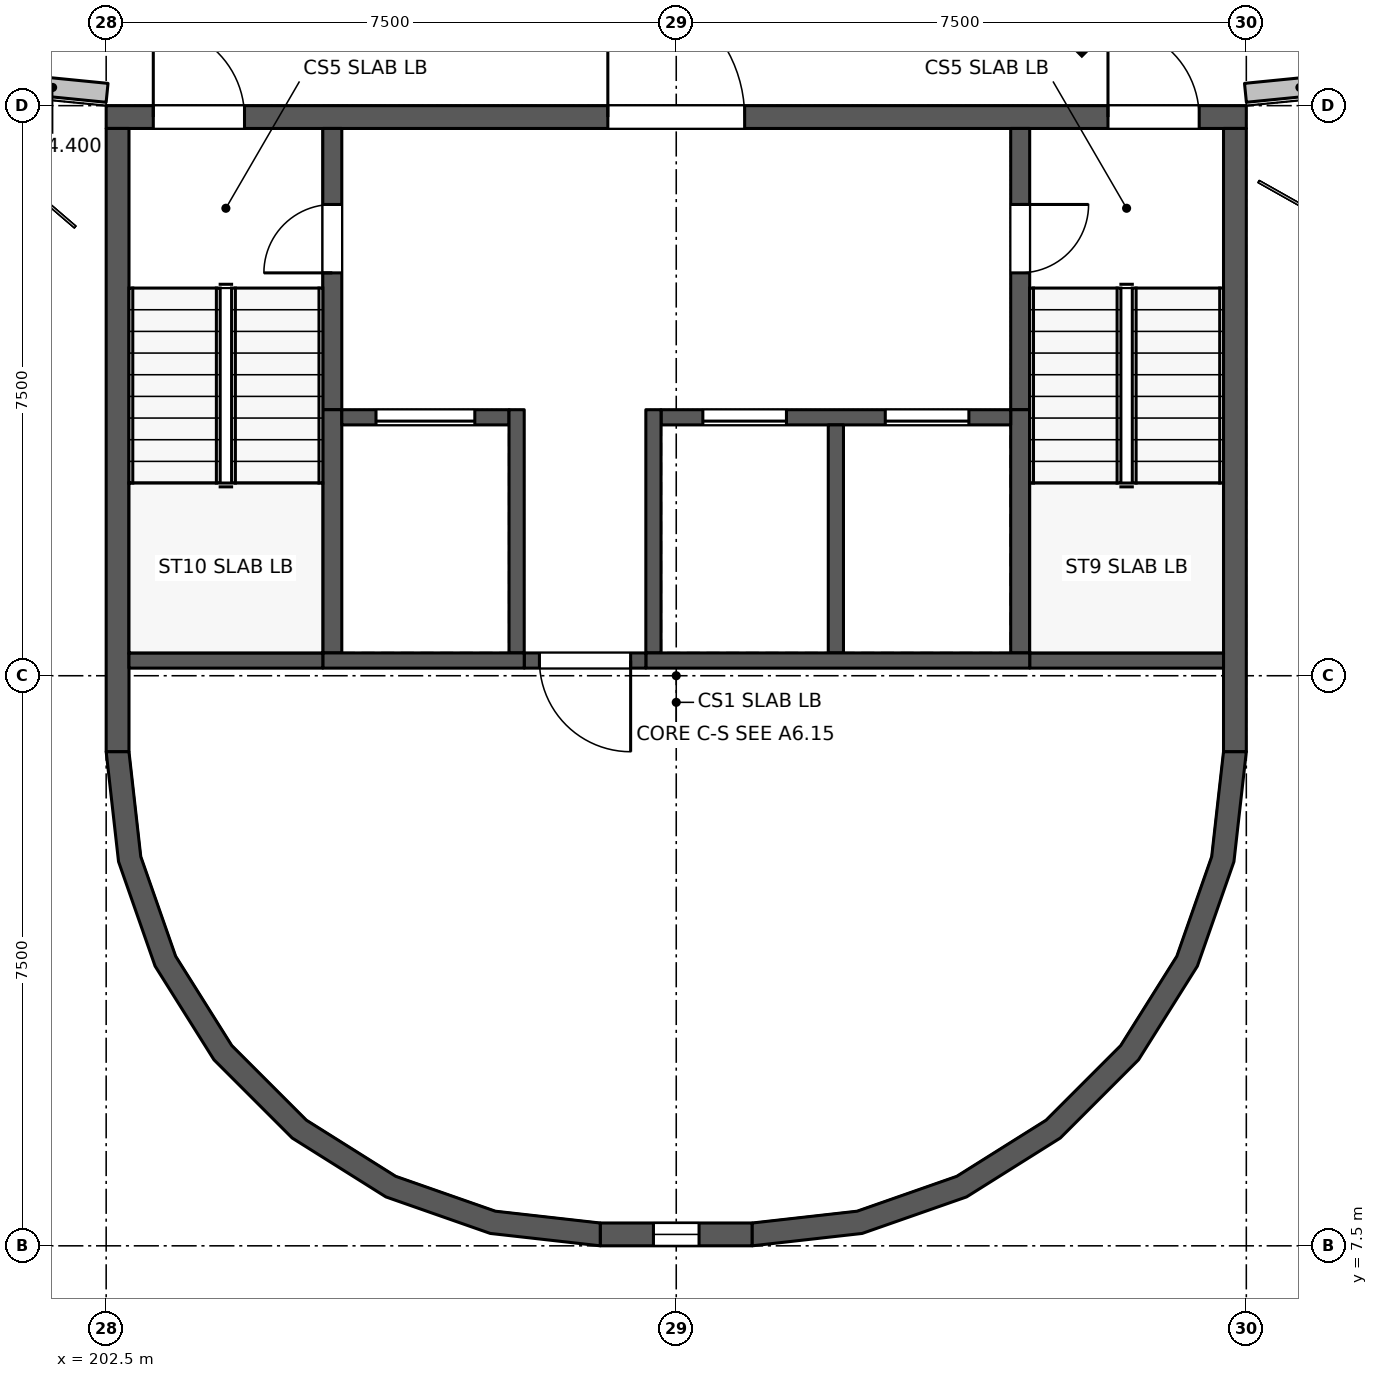
"""IFC4 building model, lengths in metres.
Left out: names, types, materials, properties, quantities, classifications, styles, units other than length and angle.
Written with IfcOpenShell. Run it as: python <this file> out.ifc"""

import sys

from ifc_helpers import new_model, si_unit, direction, frame, frame_2d, origin, place, context, subcontext, project, spatial, polyline, rectangle, outline, extrude, element, fill, save


model = new_model("IFC4")
c1 = context("Model", 3, precision=1e-05, world=origin(), true_north=direction((0.0, 1.0)))
c2 = subcontext(c1, "Body", "Model", "MODEL_VIEW")
j1 = project(units=[si_unit("LENGTHUNIT", "METRE"), si_unit("PLANEANGLEUNIT", "RADIAN")], contexts=[c1])
p1 = place(None, origin())
s1 = spatial("IfcSite", under=j1, at=p1, CompositionType="ELEMENT")
p2 = place(p1, origin())
s2 = spatial("IfcBuilding", under=s1, at=p2, CompositionType="ELEMENT")
p3 = place(p2, frame((0.0, 0.0, 3.3)))
s3 = spatial("IfcBuildingStorey", under=s2, at=p3, CompositionType="ELEMENT", Elevation=3.3)
p4 = place(p3, frame((201.079, 22.811, 0.0), z_axis=(0.0, 0.0, 1.0), x_axis=(0.995137391066, -0.098496562898, 0.0)))
e1 = element("IfcWall", 1, at=p4, inside=s3, PredefinedType="SOLIDWALL", context=c2, shape_type="SweptSolid", body=[
    extrude(rectangle(XDim=1.44, YDim=0.25, at=frame_2d((0.72, 0.0))), origin(), (0.0, 0.0, 1.0), 1.1),
])
p5 = place(p3, frame((217.489, 22.669, 0.0), z_axis=(0.0, 0.0, 1.0), x_axis=(0.995122410186, 0.098647801521, 0.0)))
e2 = element("IfcWall", 2, at=p5, inside=s3, PredefinedType="SOLIDWALL", context=c2, shape_type="SweptSolid", body=[
    extrude(rectangle(XDim=1.44, YDim=0.25, at=frame_2d((0.72, 0.0))), origin(), (0.0, 0.0, 1.0), 1.1),
])
p6 = place(p3, frame((202.5, 22.35, 0.0), z_axis=(0.0, 0.0, 1.0), x_axis=(1.0, 0.0, 0.0)))
e3 = element("IfcWall", 3, at=p6, inside=s3, PredefinedType="SHEAR", context=c2, shape_type="SweptSolid", body=[
    extrude(rectangle(XDim=15.0, YDim=0.3, at=frame_2d((7.5, 0.0))), origin(), (0.0, 0.0, 1.0), 3.3),
])
p7 = place(p6, frame((13.18, 0.0, 0.0)))
e4 = element("IfcOpeningElement", 4, at=p7, cuts=e3, PredefinedType="OPENING", context=c2, shape_type="SweptSolid", body=[
    extrude(rectangle(XDim=1.2, YDim=2.1, at=frame_2d((0.6, 1.05))), frame((0.0, 0.16, 0.0), z_axis=(0.0, -1.0, 0.0), x_axis=(1.0, 0.0, 0.0)), (0.0, 0.0, 1.0), 0.32),
])
p8 = place(p6, frame((0.62, 0.0, 0.0)))
e5 = element("IfcOpeningElement", 5, at=p8, cuts=e3, PredefinedType="OPENING", context=c2, shape_type="SweptSolid", body=[
    extrude(rectangle(XDim=1.2, YDim=2.1, at=frame_2d((0.6, 1.05))), frame((0.0, 0.16, 0.0), z_axis=(0.0, -1.0, 0.0), x_axis=(1.0, 0.0, 0.0)), (0.0, 0.0, 1.0), 0.32),
])
p9 = place(p6, frame((6.6, 0.0, 0.0)))
e6 = element("IfcOpeningElement", 6, at=p9, cuts=e3, PredefinedType="OPENING", context=c2, shape_type="SweptSolid", body=[
    extrude(rectangle(XDim=1.8, YDim=2.1, at=frame_2d((0.9, 1.05))), frame((0.0, 0.16, 0.0), z_axis=(0.0, -1.0, 0.0), x_axis=(1.0, 0.0, 0.0)), (0.0, 0.0, 1.0), 0.32),
])
p10 = place(p3, frame((211.0, 7.65, 0.0), z_axis=(0.0, 0.0, 1.0), x_axis=(-1.0, 0.0, 0.0)))
e7 = element("IfcWall", 7, at=p10, inside=s3, PredefinedType="SHEAR", context=c2, shape_type="SweptSolid", body=[
    extrude(rectangle(XDim=2.0, YDim=0.3, at=frame_2d((1.0, 0.0))), origin(), (0.0, 0.0, 1.0), 3.3),
])
p11 = place(p10, frame((0.7, 0.0, 0.3)))
e8 = element("IfcOpeningElement", 8, at=p11, cuts=e7, PredefinedType="OPENING", context=c2, shape_type="SweptSolid", body=[
    extrude(rectangle(XDim=0.6, YDim=2.7, at=frame_2d((0.3, 1.35))), frame((0.0, 0.16, 0.0), z_axis=(0.0, -1.0, 0.0), x_axis=(1.0, 0.0, 0.0)), (0.0, 0.0, 1.0), 0.32),
])
for number, where, z_axis, x_axis in (
    (9, (217.35, 22.2, 0.0), (0.0, 0.0, 1.0), (0.0, -1.0, 0.0)),
    (10, (202.65, 14.0, 0.0), (0.0, 0.0, 1.0), (0.0, 1.0, 0.0)),
):
    element("IfcWall", number, at=place(p3, frame(where, z_axis=z_axis, x_axis=x_axis)), inside=s3, PredefinedType="SHEAR", context=c2, shape_type="SweptSolid", body=[
        extrude(rectangle(XDim=8.2, YDim=0.3, at=frame_2d((4.1, 0.0))), origin(), (0.0, 0.0, 1.0), 3.3),
    ])
p12 = place(p3, frame((214.525, 22.2, 0.0), z_axis=(0.0, 0.0, 1.0), x_axis=(0.0, -1.0, 0.0)))
e11 = element("IfcWall", 11, at=p12, inside=s3, PredefinedType="STANDARD", context=c2, shape_type="SweptSolid", body=[
    extrude(rectangle(XDim=3.7, YDim=0.25, at=frame_2d((1.85, 0.0))), origin(), (0.0, 0.0, 1.0), 3.1),
])
p13 = place(p12, frame((1.0, 0.0, 0.0)))
e12 = element("IfcOpeningElement", 12, at=p13, cuts=e11, PredefinedType="OPENING", context=c2, shape_type="SweptSolid", body=[
    extrude(rectangle(XDim=0.9, YDim=2.1, at=frame_2d((0.45, 1.05))), frame((0.0, 0.135, 0.0), z_axis=(0.0, -1.0, 0.0), x_axis=(1.0, 0.0, 0.0)), (0.0, 0.0, 1.0), 0.27),
])
p14 = place(p3, frame((214.525, 18.5, 0.0), z_axis=(0.0, 0.0, 1.0), x_axis=(0.0, -1.0, 0.0)))
e13 = element("IfcWall", 13, at=p14, inside=s3, PredefinedType="STANDARD", context=c2, shape_type="SweptSolid", body=[
    extrude(rectangle(XDim=3.2, YDim=0.25, at=frame_2d((1.6, 0.0))), origin(), (0.0, 0.0, 1.0), 3.1),
])
p15 = place(p3, frame((205.475, 18.5, 0.0), z_axis=(0.0, 0.0, 1.0), x_axis=(0.0, 1.0, 0.0)))
e14 = element("IfcWall", 14, at=p15, inside=s3, PredefinedType="STANDARD", context=c2, shape_type="SweptSolid", body=[
    extrude(rectangle(XDim=3.7, YDim=0.25, at=frame_2d((1.85, 0.0))), origin(), (0.0, 0.0, 1.0), 3.1),
])
p16 = place(p15, frame((1.8, 0.0, 0.0)))
e15 = element("IfcOpeningElement", 15, at=p16, cuts=e14, PredefinedType="OPENING", context=c2, shape_type="SweptSolid", body=[
    extrude(rectangle(XDim=0.9, YDim=2.1, at=frame_2d((0.45, 1.05))), frame((0.0, 0.135, 0.0), z_axis=(0.0, -1.0, 0.0), x_axis=(1.0, 0.0, 0.0)), (0.0, 0.0, 1.0), 0.27),
])
p17 = place(p3, frame((205.475, 18.5, 0.0), z_axis=(0.0, 0.0, 1.0), x_axis=(0.0, -1.0, 0.0)))
e16 = element("IfcWall", 16, at=p17, inside=s3, PredefinedType="STANDARD", context=c2, shape_type="SweptSolid", body=[
    extrude(rectangle(XDim=3.2, YDim=0.25, at=frame_2d((1.6, 0.0))), origin(), (0.0, 0.0, 1.0), 3.1),
])
p18 = place(p3, frame((214.4, 18.4, 0.0), z_axis=(0.0, 0.0, 1.0), x_axis=(-1.0, 0.0, 0.0)))
e17 = element("IfcWall", 17, at=p18, inside=s3, PredefinedType="STANDARD", context=c2, shape_type="SweptSolid", body=[
    extrude(rectangle(XDim=4.6, YDim=0.2, at=frame_2d((2.3, 0.0))), origin(), (0.0, 0.0, 1.0), 3.1),
])
p19 = place(p18, frame((0.55, 0.0, 0.0)))
e18 = element("IfcOpeningElement", 18, at=p19, cuts=e17, PredefinedType="OPENING", context=c2, shape_type="SweptSolid", body=[
    extrude(rectangle(XDim=1.1, YDim=2.1, at=frame_2d((0.55, 1.05))), frame((0.0, 0.11, 0.0), z_axis=(0.0, -1.0, 0.0), x_axis=(1.0, 0.0, 0.0)), (0.0, 0.0, 1.0), 0.22),
])
p20 = place(p18, frame((2.95, 0.0, 0.0)))
e19 = element("IfcOpeningElement", 19, at=p20, cuts=e17, PredefinedType="OPENING", context=c2, shape_type="SweptSolid", body=[
    extrude(rectangle(XDim=1.1, YDim=2.1, at=frame_2d((0.55, 1.05))), frame((0.0, 0.11, 0.0), z_axis=(0.0, -1.0, 0.0), x_axis=(1.0, 0.0, 0.0)), (0.0, 0.0, 1.0), 0.22),
])
p21 = place(p3, frame((207.8, 18.4, 0.0), z_axis=(0.0, 0.0, 1.0), x_axis=(-1.0, 0.0, 0.0)))
e20 = element("IfcWall", 20, at=p21, inside=s3, PredefinedType="STANDARD", context=c2, shape_type="SweptSolid", body=[
    extrude(rectangle(XDim=2.2, YDim=0.2, at=frame_2d((1.1, 0.0))), origin(), (0.0, 0.0, 1.0), 3.1),
])
p22 = place(p21, frame((0.45, 0.0, 0.0)))
e21 = element("IfcOpeningElement", 21, at=p22, cuts=e20, PredefinedType="OPENING", context=c2, shape_type="SweptSolid", body=[
    extrude(rectangle(XDim=1.3, YDim=2.1, at=frame_2d((0.65, 1.05))), frame((0.0, 0.11, 0.0), z_axis=(0.0, -1.0, 0.0), x_axis=(1.0, 0.0, 0.0)), (0.0, 0.0, 1.0), 0.22),
])
p23 = place(p3, frame((212.1, 18.3, 0.0), z_axis=(0.0, 0.0, 1.0), x_axis=(0.0, -1.0, 0.0)))
e22 = element("IfcWall", 22, at=p23, inside=s3, PredefinedType="STANDARD", context=c2, shape_type="SweptSolid", body=[
    extrude(rectangle(XDim=3.0, YDim=0.2, at=frame_2d((1.5, 0.0))), origin(), (0.0, 0.0, 1.0), 3.1),
])
for number, where, z_axis, x_axis in (
    (23, (209.7, 18.5, 0.0), (0.0, 0.0, 1.0), (0.0, -1.0, 0.0)),
    (24, (207.9, 18.5, 0.0), (0.0, 0.0, 1.0), (0.0, -1.0, 0.0)),
):
    element("IfcWall", number, at=place(p3, frame(where, z_axis=z_axis, x_axis=x_axis)), inside=s3, PredefinedType="STANDARD", context=c2, shape_type="SweptSolid", body=[
        extrude(rectangle(XDim=3.2, YDim=0.2, at=frame_2d((1.6, 0.0))), origin(), (0.0, 0.0, 1.0), 3.1),
    ])
p24 = place(p3, frame((217.2, 15.2, 0.0), z_axis=(0.0, 0.0, 1.0), x_axis=(-1.0, 0.0, 0.0)))
e25 = element("IfcWall", 25, at=p24, inside=s3, PredefinedType="STANDARD", context=c2, shape_type="SweptSolid", body=[
    extrude(rectangle(XDim=2.55, YDim=0.2, at=frame_2d((1.275, 0.0))), origin(), (0.0, 0.0, 1.0), 3.1),
])
p25 = place(p3, frame((214.65, 15.2, 0.0), z_axis=(0.0, 0.0, 1.0), x_axis=(-1.0, 0.0, 0.0)))
e26 = element("IfcWall", 26, at=p25, inside=s3, PredefinedType="STANDARD", context=c2, shape_type="SweptSolid", body=[
    extrude(rectangle(XDim=5.05, YDim=0.2, at=frame_2d((2.525, 0.0))), origin(), (0.0, 0.0, 1.0), 3.1),
])
p26 = place(p3, frame((209.6, 15.2, 0.0), z_axis=(0.0, 0.0, 1.0), x_axis=(-1.0, 0.0, 0.0)))
e27 = element("IfcWall", 27, at=p26, inside=s3, PredefinedType="STANDARD", context=c2, shape_type="SweptSolid", body=[
    extrude(rectangle(XDim=1.6, YDim=0.2, at=frame_2d((0.8, 0.0))), origin(), (0.0, 0.0, 1.0), 3.1),
])
p27 = place(p26, frame((0.2, 0.0, 0.0)))
e28 = element("IfcOpeningElement", 28, at=p27, cuts=e27, PredefinedType="OPENING", context=c2, shape_type="SweptSolid", body=[
    extrude(rectangle(XDim=1.2, YDim=2.1, at=frame_2d((0.6, 1.05))), frame((0.0, 0.11, 0.0), z_axis=(0.0, -1.0, 0.0), x_axis=(1.0, 0.0, 0.0)), (0.0, 0.0, 1.0), 0.22),
])
p28 = place(p3, frame((208.0, 15.2, 0.0), z_axis=(0.0, 0.0, 1.0), x_axis=(-1.0, 0.0, 0.0)))
e29 = element("IfcWall", 29, at=p28, inside=s3, PredefinedType="STANDARD", context=c2, shape_type="SweptSolid", body=[
    extrude(rectangle(XDim=2.65, YDim=0.2, at=frame_2d((1.325, 0.0))), origin(), (0.0, 0.0, 1.0), 3.1),
])
p29 = place(p3, frame((205.35, 15.2, 0.0), z_axis=(0.0, 0.0, 1.0), x_axis=(-1.0, 0.0, 0.0)))
e30 = element("IfcWall", 30, at=p29, inside=s3, PredefinedType="STANDARD", context=c2, shape_type="SweptSolid", body=[
    extrude(rectangle(XDim=2.55, YDim=0.2, at=frame_2d((1.275, 0.0))), origin(), (0.0, 0.0, 1.0), 3.1),
])
p30 = place(p3, origin())
e31 = element("IfcWall", 31, at=p30, inside=s3, PredefinedType="SHEAR", context=c2, shape_type="SweptSolid", body=[
    extrude(outline(polyline([(217.5, 14.0), (217.337, 12.554), (216.856, 11.18), (216.082, 9.947), (215.053, 8.918), (213.82, 8.144), (212.446, 7.663), (211.0, 7.5), (211.0, 7.8), (212.38, 7.955), (213.69, 8.414), (214.865, 9.153), (215.847, 10.135), (216.586, 11.31), (217.045, 12.62), (217.2, 14.0), (217.5, 14.0)])), origin(), (0.0, 0.0, 1.0), 3.3),
])
p31 = place(p3, origin())
e32 = element("IfcWall", 32, at=p31, inside=s3, PredefinedType="SHEAR", context=c2, shape_type="SweptSolid", body=[
    extrude(outline(polyline([(202.5, 14.0), (202.663, 12.554), (203.144, 11.18), (203.918, 9.947), (204.947, 8.918), (206.18, 8.144), (207.554, 7.663), (209.0, 7.5), (209.0, 7.8), (207.62, 7.955), (206.31, 8.414), (205.135, 9.153), (204.153, 10.135), (203.414, 11.31), (202.955, 12.62), (202.8, 14.0), (202.5, 14.0)])), origin(), (0.0, 0.0, 1.0), 3.3),
])
p32 = place(p7, origin())
e33 = element("IfcDoor", 33, at=p32, inside=s3, OperationType="SINGLE_SWING_RIGHT", PredefinedType="DOOR", context=c2, shape_type="SweptSolid", body=[
    extrude(rectangle(XDim=1.2, YDim=2.1, at=frame_2d((0.6, 1.05))), frame((0.0, 0.025, 0.0), z_axis=(0.0, -1.0, 0.0), x_axis=(1.0, 0.0, 0.0)), (0.0, 0.0, 1.0), 0.05),
])
fill(e4, e33)
p33 = place(p8, origin())
e34 = element("IfcDoor", 34, at=p33, inside=s3, OperationType="SINGLE_SWING_LEFT", PredefinedType="DOOR", context=c2, shape_type="SweptSolid", body=[
    extrude(rectangle(XDim=1.2, YDim=2.1, at=frame_2d((0.6, 1.05))), frame((0.0, 0.025, 0.0), z_axis=(0.0, -1.0, 0.0), x_axis=(1.0, 0.0, 0.0)), (0.0, 0.0, 1.0), 0.05),
])
fill(e5, e34)
p34 = place(p9, origin())
e35 = element("IfcDoor", 35, at=p34, inside=s3, OperationType="DOUBLE_DOOR_SINGLE_SWING", PredefinedType="DOOR", context=c2, shape_type="SweptSolid", body=[
    extrude(rectangle(XDim=1.8, YDim=2.1, at=frame_2d((0.9, 1.05))), frame((0.0, 0.025, 0.0), z_axis=(0.0, -1.0, 0.0), x_axis=(1.0, 0.0, 0.0)), (0.0, 0.0, 1.0), 0.05),
])
fill(e6, e35)
p35 = place(p13, origin())
e36 = element("IfcDoor", 36, at=p35, inside=s3, OperationType="SINGLE_SWING_LEFT", PredefinedType="DOOR", context=c2, shape_type="SweptSolid", body=[
    extrude(rectangle(XDim=0.9, YDim=2.1, at=frame_2d((0.45, 1.05))), frame((0.0, 0.025, 0.0), z_axis=(0.0, -1.0, 0.0), x_axis=(1.0, 0.0, 0.0)), (0.0, 0.0, 1.0), 0.05),
])
fill(e12, e36)
p36 = place(p16, origin())
e37 = element("IfcDoor", 37, at=p36, inside=s3, OperationType="SINGLE_SWING_RIGHT", PredefinedType="DOOR", context=c2, shape_type="SweptSolid", body=[
    extrude(rectangle(XDim=0.9, YDim=2.1, at=frame_2d((0.45, 1.05))), frame((0.0, 0.025, 0.0), z_axis=(0.0, -1.0, 0.0), x_axis=(1.0, 0.0, 0.0)), (0.0, 0.0, 1.0), 0.05),
])
fill(e15, e37)
p37 = place(p19, origin())
e38 = element("IfcDoor", 38, at=p37, inside=s3, OperationType="DOUBLE_DOOR_SLIDING", PredefinedType="DOOR", context=c2, shape_type="SweptSolid", body=[
    extrude(rectangle(XDim=1.1, YDim=2.1, at=frame_2d((0.55, 1.05))), frame((0.0, 0.025, 0.0), z_axis=(0.0, -1.0, 0.0), x_axis=(1.0, 0.0, 0.0)), (0.0, 0.0, 1.0), 0.05),
])
fill(e18, e38)
p38 = place(p20, origin())
e39 = element("IfcDoor", 39, at=p38, inside=s3, OperationType="DOUBLE_DOOR_SLIDING", PredefinedType="DOOR", context=c2, shape_type="SweptSolid", body=[
    extrude(rectangle(XDim=1.1, YDim=2.1, at=frame_2d((0.55, 1.05))), frame((0.0, 0.025, 0.0), z_axis=(0.0, -1.0, 0.0), x_axis=(1.0, 0.0, 0.0)), (0.0, 0.0, 1.0), 0.05),
])
fill(e19, e39)
p39 = place(p22, origin())
e40 = element("IfcDoor", 40, at=p39, inside=s3, OperationType="DOUBLE_DOOR_SLIDING", PredefinedType="DOOR", context=c2, shape_type="SweptSolid", body=[
    extrude(rectangle(XDim=1.3, YDim=2.1, at=frame_2d((0.65, 1.05))), frame((0.0, 0.025, 0.0), z_axis=(0.0, -1.0, 0.0), x_axis=(1.0, 0.0, 0.0)), (0.0, 0.0, 1.0), 0.05),
])
fill(e21, e40)
p40 = place(p27, origin())
e41 = element("IfcDoor", 41, at=p40, inside=s3, OperationType="SINGLE_SWING_RIGHT", PredefinedType="DOOR", context=c2, shape_type="SweptSolid", body=[
    extrude(rectangle(XDim=1.2, YDim=2.1, at=frame_2d((0.6, 1.05))), frame((0.0, 0.025, 0.0), z_axis=(0.0, -1.0, 0.0), x_axis=(1.0, 0.0, 0.0)), (0.0, 0.0, 1.0), 0.05),
])
fill(e28, e41)
p41 = place(p11, origin())
e42 = element("IfcWindow", 42, at=p41, inside=s3, PartitioningType="SINGLE_PANEL", PredefinedType="WINDOW", context=c2, shape_type="SweptSolid", body=[
    extrude(rectangle(XDim=0.6, YDim=2.7, at=frame_2d((0.3, 1.35))), frame((0.0, 0.03, 0.0), z_axis=(0.0, -1.0, 0.0), x_axis=(1.0, 0.0, 0.0)), (0.0, 0.0, 1.0), 0.06),
])
fill(e8, e42)
save(model, sys.argv[1])
